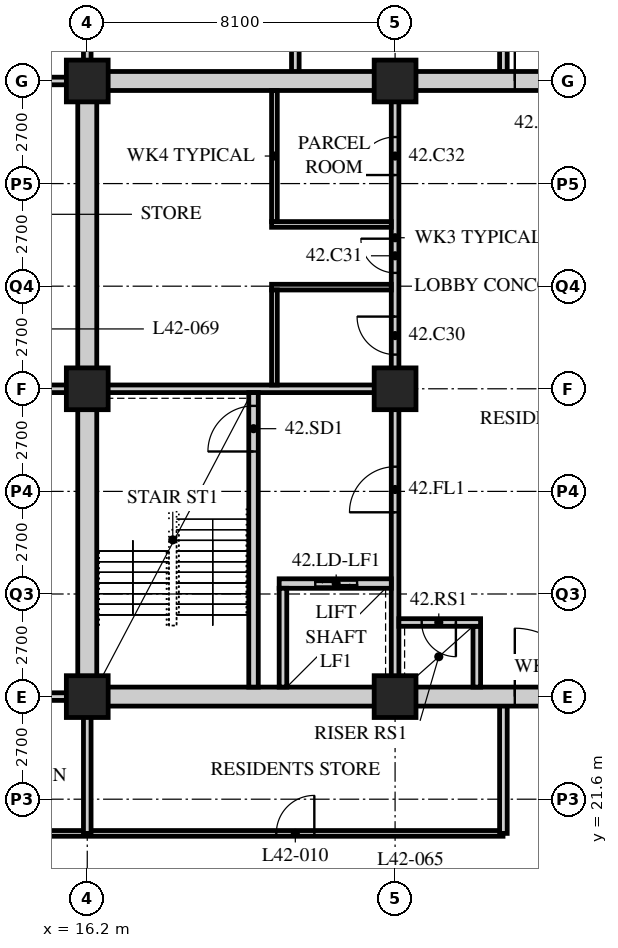
"""IFC4 building model, lengths in metres.
Left out: names, types, materials, properties, quantities, classifications, styles, units other than length and angle.
Written with IfcOpenShell. Run it as: python <this file> out.ifc"""

import sys

from ifc_helpers import new_model, si_unit, direction, frame, frame_2d, origin, origin_2d, place, context, subcontext, project, spatial, rectangle, hollow_rectangle, extrude, element, fill, save


model = new_model("IFC4")
c1 = context("Model", 3, precision=1e-05, world=origin(), true_north=direction((0.0, 1.0)))
c2 = subcontext(c1, "Body", "Model", "MODEL_VIEW")
j1 = project(units=[si_unit("LENGTHUNIT", "METRE"), si_unit("PLANEANGLEUNIT", "RADIAN")], contexts=[c1])
p1 = place(None, origin())
s1 = spatial("IfcSite", under=j1, at=p1, CompositionType="ELEMENT")
p2 = place(p1, origin())
s2 = spatial("IfcBuilding", under=s1, at=p2, CompositionType="ELEMENT")
p3 = place(p2, frame((0.0, 0.0, 165.0)))
s3 = spatial("IfcBuildingStorey", under=s2, at=p3, CompositionType="ELEMENT", Elevation=165.0)
for number, where, z_axis, x_axis in (
    (1, (16.2, 24.3, 0.0), (0.0, 0.0, 1.0), (1.0, 0.0, 0.0)),
    (2, (16.2, 32.4, 0.0), (0.0, 0.0, 1.0), (1.0, 0.0, 0.0)),
    (3, (16.2, 40.5, 0.0), (0.0, 0.0, 1.0), (1.0, 0.0, 0.0)),
    (4, (24.3, 24.3, 0.0), (0.0, 0.0, 1.0), (1.0, 0.0, 0.0)),
    (5, (24.3, 32.4, 0.0), (0.0, 0.0, 1.0), (1.0, 0.0, 0.0)),
    (6, (24.3, 40.5, 0.0), (0.0, 0.0, 1.0), (1.0, 0.0, 0.0)),
):
    element("IfcColumn", number, at=place(p3, frame(where, z_axis=z_axis, x_axis=x_axis)), inside=s3, PredefinedType="COLUMN", context=c2, shape_type="SweptSolid", body=[
        extrude(hollow_rectangle(XDim=1.1, YDim=1.1, WallThickness=0.1, at=origin_2d()), origin(), (0.0, 0.0, 1.0), 5.4),
    ])
p4 = place(p3, frame((9.9, 20.7, 0.0), z_axis=(0.0, 0.0, 1.0), x_axis=(1.0, 0.0, 0.0)))
e7 = element("IfcWall", 7, at=p4, inside=s3, PredefinedType="PARTITIONING", context=c2, shape_type="SweptSolid", body=[
    extrude(rectangle(XDim=17.24, YDim=0.15, at=frame_2d((8.62, 0.0))), origin(), (0.0, 0.0, 1.0), 5.19),
])
p5 = place(p4, frame((2.65, 0.0, 0.0)))
e8 = element("IfcOpeningElement", 8, at=p5, cuts=e7, PredefinedType="OPENING", context=c2, shape_type="SweptSolid", body=[
    extrude(rectangle(XDim=1.0, YDim=2.1, at=frame_2d((0.5, 1.05))), frame((0.0, 0.085, 0.0), z_axis=(0.0, -1.0, 0.0), x_axis=(1.0, 0.0, 0.0)), (0.0, 0.0, 1.0), 0.17),
])
p6 = place(p4, frame((11.275, 0.0, 0.0)))
e9 = element("IfcOpeningElement", 9, at=p6, cuts=e7, PredefinedType="OPENING", context=c2, shape_type="SweptSolid", body=[
    extrude(rectangle(XDim=1.0, YDim=2.1, at=frame_2d((0.5, 1.05))), frame((0.0, 0.085, 0.0), z_axis=(0.0, -1.0, 0.0), x_axis=(1.0, 0.0, 0.0)), (0.0, 0.0, 1.0), 0.17),
])
p7 = place(p3, frame((9.9, 32.4, 0.0), z_axis=(0.0, 0.0, 1.0), x_axis=(1.0, 0.0, 0.0)))
e10 = element("IfcWall", 10, at=p7, inside=s3, PredefinedType="SOLIDWALL", context=c2, shape_type="SweptSolid", body=[
    extrude(rectangle(XDim=6.3, YDim=0.2, at=frame_2d((3.15, 0.0))), origin(), (0.0, 0.0, 1.0), 5.19),
])
p8 = place(p3, frame((16.2, 20.7, 0.0), z_axis=(0.0, 0.0, 1.0), x_axis=(0.0, 1.0, 0.0)))
e11 = element("IfcWall", 11, at=p8, inside=s3, PredefinedType="SOLIDWALL", context=c2, shape_type="SweptSolid", body=[
    extrude(rectangle(XDim=3.6, YDim=0.2, at=frame_2d((1.8, 0.0))), origin(), (0.0, 0.0, 1.0), 4.42),
])
p9 = place(p3, frame((27.15, 20.7, 0.0), z_axis=(0.0, 0.0, 1.0), x_axis=(0.0, 1.0, 0.0)))
e12 = element("IfcWall", 12, at=p9, inside=s3, PredefinedType="SOLIDWALL", context=c2, shape_type="SweptSolid", body=[
    extrude(rectangle(XDim=3.6, YDim=0.2, at=frame_2d((1.8, 0.0))), origin(), (0.0, 0.0, 1.0), 5.19),
])
p10 = place(p3, frame((16.2, 40.5, 0.0), z_axis=(0.0, 0.0, 1.0), x_axis=(0.0, 1.0, 0.0)))
e13 = element("IfcWall", 13, at=p10, inside=s3, PredefinedType="SOLIDWALL", context=c2, shape_type="SweptSolid", body=[
    extrude(rectangle(XDim=9.0, YDim=0.2, at=frame_2d((4.5, 0.0))), origin(), (0.0, 0.0, 1.0), 4.42),
])
for number, where, z_axis, x_axis in (
    (14, (21.675, 49.5, 0.0), (0.0, 0.0, 1.0), (0.0, -1.0, 0.0)),
    (15, (27.15, 40.5, 0.0), (0.0, 0.0, 1.0), (0.0, 1.0, 0.0)),
):
    element("IfcWall", number, at=place(p3, frame(where, z_axis=z_axis, x_axis=x_axis)), inside=s3, PredefinedType="SOLIDWALL", context=c2, shape_type="SweptSolid", body=[
        extrude(rectangle(XDim=9.0, YDim=0.2, at=frame_2d((4.5, 0.0))), origin(), (0.0, 0.0, 1.0), 5.19),
    ])
for number, where, z_axis, x_axis in (
    (16, (9.9, 24.3, 0.0), (0.0, 0.0, 1.0), (1.0, 0.0, 0.0)),
    (17, (9.9, 40.5, 0.0), (0.0, 0.0, 1.0), (1.0, 0.0, 0.0)),
):
    element("IfcWall", number, at=place(p3, frame(where, z_axis=z_axis, x_axis=x_axis)), inside=s3, PredefinedType="SOLIDWALL", context=c2, shape_type="SweptSolid", body=[
        extrude(rectangle(XDim=6.3, YDim=0.2, at=frame_2d((3.15, 0.0))), origin(), (0.0, 0.0, 1.0), 5.19),
    ])
p11 = place(p3, frame((15.95, 24.3, 0.0), z_axis=(0.0, 0.0, 1.0), x_axis=(1.0, 0.0, 0.0)))
e18 = element("IfcWall", 18, at=p11, inside=s3, PredefinedType="SOLIDWALL", context=c2, shape_type="SweptSolid", body=[
    extrude(rectangle(XDim=24.8, YDim=0.5, at=frame_2d((12.4, 0.0))), origin(), (0.0, 0.0, 1.0), 4.42),
])
p12 = place(p11, frame((11.5, 0.0, 0.0)))
e19 = element("IfcOpeningElement", 19, at=p12, cuts=e18, PredefinedType="OPENING", context=c2, shape_type="SweptSolid", body=[
    extrude(rectangle(XDim=1.8, YDim=2.4, at=frame_2d((0.9, 1.2))), frame((0.0, 0.26, 0.0), z_axis=(0.0, -1.0, 0.0), x_axis=(1.0, 0.0, 0.0)), (0.0, 0.0, 1.0), 0.52),
])
p13 = place(p3, frame((15.95, 40.5, 0.0), z_axis=(0.0, 0.0, 1.0), x_axis=(1.0, 0.0, 0.0)))
e20 = element("IfcWall", 20, at=p13, inside=s3, PredefinedType="SOLIDWALL", context=c2, shape_type="SweptSolid", body=[
    extrude(rectangle(XDim=24.8, YDim=0.5, at=frame_2d((12.4, 0.0))), origin(), (0.0, 0.0, 1.0), 4.42),
])
p14 = place(p13, frame((11.5, 0.0, 0.0)))
e21 = element("IfcOpeningElement", 21, at=p14, cuts=e20, PredefinedType="OPENING", context=c2, shape_type="SweptSolid", body=[
    extrude(rectangle(XDim=1.8, YDim=2.4, at=frame_2d((0.9, 1.2))), frame((0.0, 0.26, 0.0), z_axis=(0.0, -1.0, 0.0), x_axis=(1.0, 0.0, 0.0)), (0.0, 0.0, 1.0), 0.52),
])
p15 = place(p3, frame((16.2, 24.55, 0.0), z_axis=(0.0, 0.0, 1.0), x_axis=(0.0, 1.0, 0.0)))
e22 = element("IfcWall", 22, at=p15, inside=s3, PredefinedType="SOLIDWALL", context=c2, shape_type="SweptSolid", body=[
    extrude(rectangle(XDim=15.7, YDim=0.5, at=frame_2d((7.85, 0.0))), origin(), (0.0, 0.0, 1.0), 4.42),
])
p16 = place(p3, frame((16.45, 32.4, 0.0), z_axis=(0.0, 0.0, 1.0), x_axis=(1.0, 0.0, 0.0)))
e23 = element("IfcWall", 23, at=p16, inside=s3, PredefinedType="SOLIDWALL", context=c2, shape_type="SweptSolid", body=[
    extrude(rectangle(XDim=7.95, YDim=0.2, at=frame_2d((3.975, 0.0))), origin(), (0.0, 0.0, 1.0), 4.578),
])
p17 = place(p3, frame((24.3, 24.55, 0.0), z_axis=(0.0, 0.0, 1.0), x_axis=(0.0, 1.0, 0.0)))
e24 = element("IfcWall", 24, at=p17, inside=s3, PredefinedType="SOLIDWALL", context=c2, shape_type="SweptSolid", body=[
    extrude(rectangle(XDim=7.75, YDim=0.2, at=frame_2d((3.875, 0.0))), origin(), (0.0, 0.0, 1.0), 4.578),
])
p18 = place(p17, frame((4.6, 0.0, 0.0)))
e25 = element("IfcOpeningElement", 25, at=p18, cuts=e24, PredefinedType="OPENING", context=c2, shape_type="SweptSolid", body=[
    extrude(rectangle(XDim=1.2, YDim=2.1, at=frame_2d((0.6, 1.05))), frame((0.0, 0.11, 0.0), z_axis=(0.0, -1.0, 0.0), x_axis=(1.0, 0.0, 0.0)), (0.0, 0.0, 1.0), 0.22),
])
p19 = place(p3, frame((20.575, 24.55, 0.0), z_axis=(0.0, 0.0, 1.0), x_axis=(0.0, 1.0, 0.0)))
e26 = element("IfcWall", 26, at=p19, inside=s3, PredefinedType="SOLIDWALL", context=c2, shape_type="SweptSolid", body=[
    extrude(rectangle(XDim=7.75, YDim=0.25, at=frame_2d((3.875, 0.0))), origin(), (0.0, 0.0, 1.0), 5.19),
])
p20 = place(p19, frame((6.2, 0.0, 0.0)))
e27 = element("IfcOpeningElement", 27, at=p20, cuts=e26, PredefinedType="OPENING", context=c2, shape_type="SweptSolid", body=[
    extrude(rectangle(XDim=1.2, YDim=2.1, at=frame_2d((0.6, 1.05))), frame((0.0, 0.135, 0.0), z_axis=(0.0, -1.0, 0.0), x_axis=(1.0, 0.0, 0.0)), (0.0, 0.0, 1.0), 0.27),
])
p21 = place(p3, frame((21.25, 27.275, 0.0), z_axis=(0.0, 0.0, 1.0), x_axis=(1.0, 0.0, 0.0)))
e28 = element("IfcWall", 28, at=p21, inside=s3, PredefinedType="SOLIDWALL", context=c2, shape_type="SweptSolid", body=[
    extrude(rectangle(XDim=2.95, YDim=0.25, at=frame_2d((1.475, 0.0))), origin(), (0.0, 0.0, 1.0), 5.19),
])
p22 = place(p21, frame((0.95, 0.0, 0.0)))
e29 = element("IfcOpeningElement", 29, at=p22, cuts=e28, PredefinedType="OPENING", context=c2, shape_type="SweptSolid", body=[
    extrude(rectangle(XDim=1.1, YDim=2.4, at=frame_2d((0.55, 1.2))), frame((0.0, 0.135, 0.0), z_axis=(0.0, -1.0, 0.0), x_axis=(1.0, 0.0, 0.0)), (0.0, 0.0, 1.0), 0.27),
])
p23 = place(p3, frame((21.35, 24.55, 0.0), z_axis=(0.0, 0.0, 1.0), x_axis=(0.0, 1.0, 0.0)))
e30 = element("IfcWall", 30, at=p23, inside=s3, PredefinedType="SOLIDWALL", context=c2, shape_type="SweptSolid", body=[
    extrude(rectangle(XDim=2.6, YDim=0.2, at=frame_2d((1.3, 0.0))), origin(), (0.0, 0.0, 1.0), 5.19),
])
p24 = place(p3, frame((26.45, 24.55, 0.0), z_axis=(0.0, 0.0, 1.0), x_axis=(0.0, 1.0, 0.0)))
e31 = element("IfcWall", 31, at=p24, inside=s3, PredefinedType="SOLIDWALL", context=c2, shape_type="SweptSolid", body=[
    extrude(rectangle(XDim=1.6, YDim=0.2, at=frame_2d((0.8, 0.0))), origin(), (0.0, 0.0, 1.0), 5.19),
])
p25 = place(p3, frame((24.4, 26.25, 0.0), z_axis=(0.0, 0.0, 1.0), x_axis=(1.0, 0.0, 0.0)))
e32 = element("IfcWall", 32, at=p25, inside=s3, PredefinedType="SOLIDWALL", context=c2, shape_type="SweptSolid", body=[
    extrude(rectangle(XDim=2.15, YDim=0.2, at=frame_2d((1.075, 0.0))), origin(), (0.0, 0.0, 1.0), 5.19),
])
p26 = place(p25, frame((0.6, 0.0, 0.0)))
e33 = element("IfcOpeningElement", 33, at=p26, cuts=e32, PredefinedType="OPENING", context=c2, shape_type="SweptSolid", body=[
    extrude(rectangle(XDim=0.9, YDim=2.1, at=frame_2d((0.45, 1.05))), frame((0.0, 0.11, 0.0), z_axis=(0.0, -1.0, 0.0), x_axis=(1.0, 0.0, 0.0)), (0.0, 0.0, 1.0), 0.22),
])
p27 = place(p3, frame((24.3, 32.5, 0.0), z_axis=(0.0, 0.0, 1.0), x_axis=(0.0, 1.0, 0.0)))
e34 = element("IfcWall", 34, at=p27, inside=s3, PredefinedType="PARTITIONING", context=c2, shape_type="SweptSolid", body=[
    extrude(rectangle(XDim=7.75, YDim=0.2, at=frame_2d((3.875, 0.0))), origin(), (0.0, 0.0, 1.0), 4.578),
])
p28 = place(p27, frame((0.8, 0.0, 0.0)))
e35 = element("IfcOpeningElement", 35, at=p28, cuts=e34, PredefinedType="OPENING", context=c2, shape_type="SweptSolid", body=[
    extrude(rectangle(XDim=1.0, YDim=2.1, at=frame_2d((0.5, 1.05))), frame((0.0, 0.11, 0.0), z_axis=(0.0, -1.0, 0.0), x_axis=(1.0, 0.0, 0.0)), (0.0, 0.0, 1.0), 0.22),
])
p29 = place(p27, frame((2.95, 0.0, 0.0)))
e36 = element("IfcOpeningElement", 36, at=p29, cuts=e34, PredefinedType="OPENING", context=c2, shape_type="SweptSolid", body=[
    extrude(rectangle(XDim=0.9, YDim=2.1, at=frame_2d((0.45, 1.05))), frame((0.0, 0.11, 0.0), z_axis=(0.0, -1.0, 0.0), x_axis=(1.0, 0.0, 0.0)), (0.0, 0.0, 1.0), 0.22),
])
p30 = place(p27, frame((5.525, 0.0, 0.0)))
e37 = element("IfcOpeningElement", 37, at=p30, cuts=e34, PredefinedType="OPENING", context=c2, shape_type="SweptSolid", body=[
    extrude(rectangle(XDim=1.0, YDim=2.1, at=frame_2d((0.5, 1.05))), frame((0.0, 0.11, 0.0), z_axis=(0.0, -1.0, 0.0), x_axis=(1.0, 0.0, 0.0)), (0.0, 0.0, 1.0), 0.22),
])
for number, where, z_axis, x_axis in (
    (38, (21.05, 35.075, 0.0), (0.0, 0.0, 1.0), (1.0, 0.0, 0.0)),
    (39, (21.05, 36.725, 0.0), (0.0, 0.0, 1.0), (1.0, 0.0, 0.0)),
):
    element("IfcWall", number, at=place(p3, frame(where, z_axis=z_axis, x_axis=x_axis)), inside=s3, PredefinedType="PARTITIONING", context=c2, shape_type="SweptSolid", body=[
        extrude(rectangle(XDim=3.15, YDim=0.15, at=frame_2d((1.575, 0.0))), origin(), (0.0, 0.0, 1.0), 5.19),
    ])
p31 = place(p3, frame((21.125, 32.5, 0.0), z_axis=(0.0, 0.0, 1.0), x_axis=(0.0, 1.0, 0.0)))
e40 = element("IfcWall", 40, at=p31, inside=s3, PredefinedType="PARTITIONING", context=c2, shape_type="SweptSolid", body=[
    extrude(rectangle(XDim=2.5, YDim=0.15, at=frame_2d((1.25, 0.0))), origin(), (0.0, 0.0, 1.0), 5.19),
])
p32 = place(p3, frame((21.125, 36.8, 0.0), z_axis=(0.0, 0.0, 1.0), x_axis=(0.0, 1.0, 0.0)))
e41 = element("IfcWall", 41, at=p32, inside=s3, PredefinedType="PARTITIONING", context=c2, shape_type="SweptSolid", body=[
    extrude(rectangle(XDim=3.45, YDim=0.15, at=frame_2d((1.725, 0.0))), origin(), (0.0, 0.0, 1.0), 5.19),
])
p33 = place(p6, origin())
e42 = element("IfcDoor", 42, at=p33, inside=s3, OperationType="SINGLE_SWING_RIGHT", PredefinedType="DOOR", context=c2, shape_type="SweptSolid", body=[
    extrude(rectangle(XDim=1.0, YDim=2.1, at=frame_2d((0.5, 1.05))), frame((0.0, 0.025, 0.0), z_axis=(0.0, -1.0, 0.0), x_axis=(1.0, 0.0, 0.0)), (0.0, 0.0, 1.0), 0.05),
])
fill(e9, e42)
p34 = place(p28, origin())
e43 = element("IfcDoor", 43, at=p34, inside=s3, OperationType="SINGLE_SWING_RIGHT", PredefinedType="DOOR", context=c2, shape_type="SweptSolid", body=[
    extrude(rectangle(XDim=1.0, YDim=2.1, at=frame_2d((0.5, 1.05))), frame((0.0, 0.025, 0.0), z_axis=(0.0, -1.0, 0.0), x_axis=(1.0, 0.0, 0.0)), (0.0, 0.0, 1.0), 0.05),
])
fill(e35, e43)
p35 = place(p29, origin())
e44 = element("IfcDoor", 44, at=p35, inside=s3, OperationType="SINGLE_SWING_RIGHT", PredefinedType="DOOR", context=c2, shape_type="SweptSolid", body=[
    extrude(rectangle(XDim=0.9, YDim=2.1, at=frame_2d((0.45, 1.05))), frame((0.0, 0.025, 0.0), z_axis=(0.0, -1.0, 0.0), x_axis=(1.0, 0.0, 0.0)), (0.0, 0.0, 1.0), 0.05),
])
fill(e36, e44)
p36 = place(p30, origin())
e45 = element("IfcDoor", 45, at=p36, inside=s3, OperationType="SINGLE_SWING_LEFT", PredefinedType="DOOR", context=c2, shape_type="SweptSolid", body=[
    extrude(rectangle(XDim=1.0, YDim=2.1, at=frame_2d((0.5, 1.05))), frame((0.0, 0.025, 0.0), z_axis=(0.0, -1.0, 0.0), x_axis=(1.0, 0.0, 0.0)), (0.0, 0.0, 1.0), 0.05),
])
fill(e37, e45)
p37 = place(p20, origin())
e46 = element("IfcDoor", 46, at=p37, inside=s3, OperationType="SINGLE_SWING_LEFT", PredefinedType="DOOR", context=c2, shape_type="SweptSolid", body=[
    extrude(rectangle(XDim=1.2, YDim=2.1, at=frame_2d((0.6, 1.05))), frame((0.0, 0.025, 0.0), z_axis=(0.0, -1.0, 0.0), x_axis=(1.0, 0.0, 0.0)), (0.0, 0.0, 1.0), 0.05),
])
fill(e27, e46)
p38 = place(p18, origin())
e47 = element("IfcDoor", 47, at=p38, inside=s3, OperationType="SINGLE_SWING_LEFT", PredefinedType="DOOR", context=c2, shape_type="SweptSolid", body=[
    extrude(rectangle(XDim=1.2, YDim=2.1, at=frame_2d((0.6, 1.05))), frame((0.0, 0.025, 0.0), z_axis=(0.0, -1.0, 0.0), x_axis=(1.0, 0.0, 0.0)), (0.0, 0.0, 1.0), 0.05),
])
fill(e25, e47)
p39 = place(p26, origin())
e48 = element("IfcDoor", 48, at=p39, inside=s3, OperationType="SINGLE_SWING_LEFT", PredefinedType="DOOR", context=c2, shape_type="SweptSolid", body=[
    extrude(rectangle(XDim=0.9, YDim=2.1, at=frame_2d((0.45, 1.05))), frame((0.0, 0.025, 0.0), z_axis=(0.0, -1.0, 0.0), x_axis=(1.0, 0.0, 0.0)), (0.0, 0.0, 1.0), 0.05),
])
fill(e33, e48)
p40 = place(p22, origin())
e49 = element("IfcDoor", 49, at=p40, inside=s3, OperationType="DOUBLE_DOOR_SLIDING", PredefinedType="DOOR", context=c2, shape_type="SweptSolid", body=[
    extrude(rectangle(XDim=1.1, YDim=2.4, at=frame_2d((0.55, 1.2))), frame((0.0, 0.025, 0.0), z_axis=(0.0, -1.0, 0.0), x_axis=(1.0, 0.0, 0.0)), (0.0, 0.0, 1.0), 0.05),
])
fill(e29, e49)
p41 = place(p12, origin())
e50 = element("IfcDoor", 50, at=p41, inside=s3, OperationType="DOUBLE_DOOR_SINGLE_SWING", PredefinedType="DOOR", context=c2, shape_type="SweptSolid", body=[
    extrude(rectangle(XDim=1.8, YDim=2.4, at=frame_2d((0.9, 1.2))), frame((0.0, 0.025, 0.0), z_axis=(0.0, -1.0, 0.0), x_axis=(1.0, 0.0, 0.0)), (0.0, 0.0, 1.0), 0.05),
])
fill(e19, e50)
p42 = place(p14, origin())
e51 = element("IfcDoor", 51, at=p42, inside=s3, OperationType="DOUBLE_DOOR_SINGLE_SWING", PredefinedType="DOOR", context=c2, shape_type="SweptSolid", body=[
    extrude(rectangle(XDim=1.8, YDim=2.4, at=frame_2d((0.9, 1.2))), frame((0.0, 0.025, 0.0), z_axis=(0.0, -1.0, 0.0), x_axis=(1.0, 0.0, 0.0)), (0.0, 0.0, 1.0), 0.05),
])
fill(e21, e51)
save(model, sys.argv[1])
